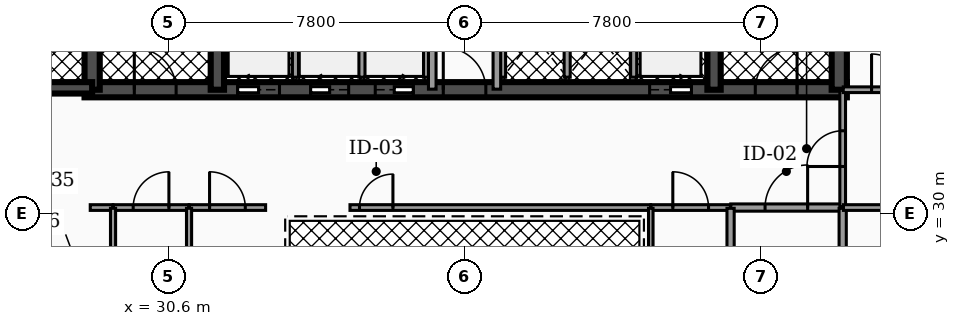
"""IFC4 building model, lengths in metres.
Left out: names, types, materials, properties, quantities, classifications, styles, units other than length and angle.
Written with IfcOpenShell. Run it as: python <this file> out.ifc"""

import sys

from ifc_helpers import new_model, si_unit, direction, frame, frame_2d, origin, place, context, subcontext, project, spatial, rectangle, extrude, element, fill, save


model = new_model("IFC4")
c1 = context("Model", 3, precision=1e-05, world=origin(), true_north=direction((0.0, 1.0)))
c2 = subcontext(c1, "Body", "Model", "MODEL_VIEW")
j1 = project(units=[si_unit("LENGTHUNIT", "METRE"), si_unit("PLANEANGLEUNIT", "RADIAN")], contexts=[c1])
p1 = place(None, origin())
s1 = spatial("IfcSite", under=j1, at=p1, CompositionType="ELEMENT")
p2 = place(p1, origin())
s2 = spatial("IfcBuilding", under=s1, at=p2, CompositionType="ELEMENT")
p3 = place(p2, frame((0.0, 0.0, 190.74)))
s3 = spatial("IfcBuildingStorey", under=s2, at=p3, CompositionType="ELEMENT", Elevation=190.74)
p4 = place(p3, frame((28.4, 33.25, 0.0), z_axis=(0.0, 0.0, 1.0), x_axis=(1.0, 0.0, 0.0)))
e1 = element("IfcWall", 1, at=p4, inside=s3, PredefinedType="SHEAR", context=c2, shape_type="SweptSolid", body=[
    extrude(rectangle(XDim=20.06, YDim=0.4, at=frame_2d((10.03, 0.0))), origin(), (0.0, 0.0, 1.0), 3.39),
])
p5 = place(p4, frame((4.03, 0.0, 0.0)))
e2 = element("IfcOpeningElement", 2, at=p5, cuts=e1, PredefinedType="OPENING", context=c2, shape_type="SweptSolid", body=[
    extrude(rectangle(XDim=1.1, YDim=2.15, at=frame_2d((0.55, 1.075))), frame((0.0, 0.21, 0.0), z_axis=(0.0, -1.0, 0.0), x_axis=(1.0, 0.0, 0.0)), (0.0, 0.0, 1.0), 0.42),
])
p6 = place(p4, frame((14.87, 0.0, 0.0)))
e3 = element("IfcOpeningElement", 3, at=p6, cuts=e1, PredefinedType="OPENING", context=c2, shape_type="SweptSolid", body=[
    extrude(rectangle(XDim=1.1, YDim=2.15, at=frame_2d((0.55, 1.075))), frame((0.0, 0.21, 0.0), z_axis=(0.0, -1.0, 0.0), x_axis=(1.0, 0.0, 0.0)), (0.0, 0.0, 1.0), 0.42),
])
p7 = place(p4, frame((5.95, 0.0, 0.0)))
e4 = element("IfcOpeningElement", 4, at=p7, cuts=e1, PredefinedType="OPENING", context=c2, shape_type="SweptSolid", body=[
    extrude(rectangle(XDim=1.0, YDim=2.1, at=frame_2d((0.5, 1.05))), frame((0.0, 0.21, 0.0), z_axis=(0.0, -1.0, 0.0), x_axis=(1.0, 0.0, 0.0)), (0.0, 0.0, 1.0), 0.42),
])
p8 = place(p4, frame((7.65, 0.0, 0.0)))
e5 = element("IfcOpeningElement", 5, at=p8, cuts=e1, PredefinedType="OPENING", context=c2, shape_type="SweptSolid", body=[
    extrude(rectangle(XDim=1.0, YDim=2.1, at=frame_2d((0.5, 1.05))), frame((0.0, 0.21, 0.0), z_axis=(0.0, -1.0, 0.0), x_axis=(1.0, 0.0, 0.0)), (0.0, 0.0, 1.0), 0.42),
])
p9 = place(p4, frame((1.31, 0.0, 0.0)))
e6 = element("IfcOpeningElement", 6, at=p9, cuts=e1, PredefinedType="OPENING", context=c2, shape_type="SweptSolid", body=[
    extrude(rectangle(XDim=1.1, YDim=2.2, at=frame_2d((0.55, 1.1))), frame((0.0, 0.21, 0.0), z_axis=(0.0, -1.0, 0.0), x_axis=(1.0, 0.0, 0.0)), (0.0, 0.0, 1.0), 0.42),
])
p10 = place(p4, frame((9.44, 0.0, 0.0)))
e7 = element("IfcOpeningElement", 7, at=p10, cuts=e1, PredefinedType="OPENING", context=c2, shape_type="SweptSolid", body=[
    extrude(rectangle(XDim=1.12, YDim=2.05, at=frame_2d((0.56, 1.025))), frame((0.0, 0.21, 0.0), z_axis=(0.0, -1.0, 0.0), x_axis=(1.0, 0.0, 0.0)), (0.0, 0.0, 1.0), 0.42),
])
p11 = place(p4, frame((17.65, 0.0, 0.0)))
e8 = element("IfcOpeningElement", 8, at=p11, cuts=e1, PredefinedType="OPENING", context=c2, shape_type="SweptSolid", body=[
    extrude(rectangle(XDim=1.1, YDim=2.2, at=frame_2d((0.55, 1.1))), frame((0.0, 0.21, 0.0), z_axis=(0.0, -1.0, 0.0), x_axis=(1.0, 0.0, 0.0)), (0.0, 0.0, 1.0), 0.42),
])
p12 = place(p3, frame((28.6, 33.25, 0.0), z_axis=(0.0, 0.0, 1.0), x_axis=(0.0, 1.0, 0.0)))
e9 = element("IfcWall", 9, at=p12, inside=s3, PredefinedType="SHEAR", context=c2, shape_type="SweptSolid", body=[
    extrude(rectangle(XDim=10.2, YDim=0.4, at=frame_2d((5.1, 0.0))), origin(), (0.0, 0.0, 1.0), 3.39),
])
for number, where, z_axis, x_axis in (
    (10, (31.895, 33.25, 0.0), (0.0, 0.0, 1.0), (0.0, 1.0, 0.0)),
    (11, (44.965, 33.25, 0.0), (0.0, 0.0, 1.0), (0.0, 1.0, 0.0)),
):
    element("IfcWall", number, at=place(p3, frame(where, z_axis=z_axis, x_axis=x_axis)), inside=s3, PredefinedType="SHEAR", context=c2, shape_type="SweptSolid", body=[
        extrude(rectangle(XDim=10.2, YDim=0.35, at=frame_2d((5.1, 0.0))), origin(), (0.0, 0.0, 1.0), 3.39),
    ])
p13 = place(p3, frame((48.26, 33.25, 0.0), z_axis=(0.0, 0.0, 1.0), x_axis=(0.0, 1.0, 0.0)))
e12 = element("IfcWall", 12, at=p13, inside=s3, PredefinedType="SHEAR", context=c2, shape_type="SweptSolid", body=[
    extrude(rectangle(XDim=10.2, YDim=0.4, at=frame_2d((5.1, 0.0))), origin(), (0.0, 0.0, 1.0), 3.39),
])
p14 = place(p3, frame((25.08, 33.3, 0.0), z_axis=(0.0, 0.0, 1.0), x_axis=(1.0, 0.0, 0.0)))
e13 = element("IfcWall", 13, at=p14, inside=s3, PredefinedType="SHEAR", context=c2, shape_type="SweptSolid", body=[
    extrude(rectangle(XDim=3.52, YDim=0.3, at=frame_2d((1.76, 0.0))), origin(), (0.0, 0.0, 1.0), 3.39),
])
p15 = place(p14, frame((1.335, 0.0, 0.0)))
e14 = element("IfcOpeningElement", 14, at=p15, cuts=e13, PredefinedType="OPENING", context=c2, shape_type="SweptSolid", body=[
    extrude(rectangle(XDim=0.95, YDim=2.2, at=frame_2d((0.475, 1.1))), frame((0.0, 0.16, 0.0), z_axis=(0.0, -1.0, 0.0), x_axis=(1.0, 0.0, 0.0)), (0.0, 0.0, 1.0), 0.32),
])
for number, where, z_axis, x_axis in (
    (15, (33.95, 33.58, 0.0), (0.0, 0.0, 1.0), (0.0, 1.0, 0.0)),
    (16, (42.85, 33.58, 0.0), (0.0, 0.0, 1.0), (0.0, 1.0, 0.0)),
):
    element("IfcWall", number, at=place(p3, frame(where, z_axis=z_axis, x_axis=x_axis)), inside=s3, PredefinedType="SOLIDWALL", context=c2, shape_type="SweptSolid", body=[
        extrude(rectangle(XDim=2.45, YDim=0.16, at=frame_2d((1.225, 0.0))), origin(), (0.0, 0.0, 1.0), 3.39),
    ])
for number, where, z_axis, x_axis in (
    (17, (35.7, 33.58, 0.0), (0.0, 0.0, 1.0), (0.0, 1.0, 0.0)),
    (18, (37.4, 33.58, 0.0), (0.0, 0.0, 1.0), (0.0, 1.0, 0.0)),
    (19, (39.4, 33.58, 0.0), (0.0, 0.0, 1.0), (0.0, 1.0, 0.0)),
    (20, (41.1, 33.58, 0.0), (0.0, 0.0, 1.0), (0.0, 1.0, 0.0)),
):
    element("IfcWall", number, at=place(p3, frame(where, z_axis=z_axis, x_axis=x_axis)), inside=s3, PredefinedType="SOLIDWALL", context=c2, shape_type="SweptSolid", body=[
        extrude(rectangle(XDim=2.25, YDim=0.16, at=frame_2d((1.125, 0.0))), origin(), (0.0, 0.0, 1.0), 3.39),
    ])
p16 = place(p3, frame((37.55, 33.265, 0.0), z_axis=(0.0, 0.0, 1.0), x_axis=(0.0, 1.0, 0.0)))
e21 = element("IfcWall", 21, at=p16, inside=s3, PredefinedType="PARTITIONING", context=c2, shape_type="SweptSolid", body=[
    extrude(rectangle(XDim=4.595, YDim=0.2, at=frame_2d((2.298, 0.0))), origin(), (0.0, 0.0, 1.0), 2.347),
])
p17 = place(p16, frame((3.058, 0.0, 0.0)))
e22 = element("IfcOpeningElement", 22, at=p17, cuts=e21, PredefinedType="OPENING", context=c2, shape_type="SweptSolid", body=[
    extrude(rectangle(XDim=0.88, YDim=2.05, at=frame_2d((0.44, 1.025))), frame((0.0, 0.11, 0.0), z_axis=(0.0, -1.0, 0.0), x_axis=(1.0, 0.0, 0.0)), (0.0, 0.0, 1.0), 0.22),
])
p18 = place(p3, frame((39.25, 33.265, 0.0), z_axis=(0.0, 0.0, 1.0), x_axis=(0.0, 1.0, 0.0)))
e23 = element("IfcWall", 23, at=p18, inside=s3, PredefinedType="PARTITIONING", context=c2, shape_type="SweptSolid", body=[
    extrude(rectangle(XDim=4.595, YDim=0.2, at=frame_2d((2.298, 0.0))), origin(), (0.0, 0.0, 1.0), 2.347),
])
p19 = place(p18, frame((3.058, 0.0, 0.0)))
e24 = element("IfcOpeningElement", 24, at=p19, cuts=e23, PredefinedType="OPENING", context=c2, shape_type="SweptSolid", body=[
    extrude(rectangle(XDim=0.88, YDim=2.05, at=frame_2d((0.44, 1.025))), frame((0.0, 0.11, 0.0), z_axis=(0.0, -1.0, 0.0), x_axis=(1.0, 0.0, 0.0)), (0.0, 0.0, 1.0), 0.22),
])
p20 = place(p3, frame((45.405, 30.15, 0.0), z_axis=(0.0, 0.0, 1.0), x_axis=(1.0, 0.0, 0.0)))
e25 = element("IfcWall", 25, at=p20, inside=s3, PredefinedType="PARTITIONING", context=c2, shape_type="SweptSolid", body=[
    extrude(rectangle(XDim=2.925, YDim=0.19, at=frame_2d((1.462, 0.0))), origin(), (0.0, 0.0, 1.0), 2.347),
])
p21 = place(p20, frame((0.903, 0.0, 0.0)))
e26 = element("IfcOpeningElement", 26, at=p21, cuts=e25, PredefinedType="OPENING", context=c2, shape_type="SweptSolid", body=[
    extrude(rectangle(XDim=1.12, YDim=2.05, at=frame_2d((0.56, 1.025))), frame((0.0, 0.105, 0.0), z_axis=(0.0, -1.0, 0.0), x_axis=(1.0, 0.0, 0.0)), (0.0, 0.0, 1.0), 0.21),
])
p22 = place(p3, frame((48.35, 30.17, 0.0), z_axis=(0.0, 0.0, 1.0), x_axis=(0.0, 1.0, 0.0)))
e27 = element("IfcWall", 27, at=p22, inside=s3, PredefinedType="PARTITIONING", context=c2, shape_type="SweptSolid", body=[
    extrude(rectangle(XDim=3.06, YDim=0.15, at=frame_2d((1.53, 0.0))), origin(), (0.0, 0.0, 1.0), 2.347),
])
p23 = place(p22, frame((1.06, 0.0, 0.0)))
e28 = element("IfcOpeningElement", 28, at=p23, cuts=e27, PredefinedType="OPENING", context=c2, shape_type="SweptSolid", body=[
    extrude(rectangle(XDim=0.94, YDim=2.05, at=frame_2d((0.47, 1.025))), frame((0.0, 0.085, 0.0), z_axis=(0.0, -1.0, 0.0), x_axis=(1.0, 0.0, 0.0)), (0.0, 0.0, 1.0), 0.17),
])
p24 = place(p3, frame((28.55, 30.15, 0.0), z_axis=(0.0, 0.0, 1.0), x_axis=(1.0, 0.0, 0.0)))
e29 = element("IfcWall", 29, at=p24, inside=s3, PredefinedType="PARTITIONING", context=c2, shape_type="SweptSolid", body=[
    extrude(rectangle(XDim=0.595, YDim=0.15, at=frame_2d((0.297, 0.0))), origin(), (0.0, 0.0, 1.0), 2.347),
])
p25 = place(p3, frame((29.155, 30.15, 0.0), z_axis=(0.0, 0.0, 1.0), x_axis=(1.0, 0.0, 0.0)))
e30 = element("IfcWall", 30, at=p25, inside=s3, PredefinedType="PARTITIONING", context=c2, shape_type="SweptSolid", body=[
    extrude(rectangle(XDim=1.99, YDim=0.15, at=frame_2d((0.995, 0.0))), origin(), (0.0, 0.0, 1.0), 2.347),
])
p26 = place(p25, frame((0.525, 0.0, 0.0)))
e31 = element("IfcOpeningElement", 31, at=p26, cuts=e30, PredefinedType="OPENING", context=c2, shape_type="SweptSolid", body=[
    extrude(rectangle(XDim=0.94, YDim=2.05, at=frame_2d((0.47, 1.025))), frame((0.0, 0.085, 0.0), z_axis=(0.0, -1.0, 0.0), x_axis=(1.0, 0.0, 0.0)), (0.0, 0.0, 1.0), 0.17),
])
p27 = place(p3, frame((31.155, 30.15, 0.0), z_axis=(0.0, 0.0, 1.0), x_axis=(1.0, 0.0, 0.0)))
e32 = element("IfcWall", 32, at=p27, inside=s3, PredefinedType="PARTITIONING", context=c2, shape_type="SweptSolid", body=[
    extrude(rectangle(XDim=2.01, YDim=0.15, at=frame_2d((1.005, 0.0))), origin(), (0.0, 0.0, 1.0), 2.347),
])
p28 = place(p27, frame((0.535, 0.0, 0.0)))
e33 = element("IfcOpeningElement", 33, at=p28, cuts=e32, PredefinedType="OPENING", context=c2, shape_type="SweptSolid", body=[
    extrude(rectangle(XDim=0.94, YDim=2.05, at=frame_2d((0.47, 1.025))), frame((0.0, 0.085, 0.0), z_axis=(0.0, -1.0, 0.0), x_axis=(1.0, 0.0, 0.0)), (0.0, 0.0, 1.0), 0.17),
])
p29 = place(p3, frame((35.385, 30.15, 0.0), z_axis=(0.0, 0.0, 1.0), x_axis=(1.0, 0.0, 0.0)))
e34 = element("IfcWall", 34, at=p29, inside=s3, PredefinedType="PARTITIONING", context=c2, shape_type="SweptSolid", body=[
    extrude(rectangle(XDim=7.91, YDim=0.15, at=frame_2d((3.955, 0.0))), origin(), (0.0, 0.0, 1.0), 2.347),
])
p30 = place(p29, frame((0.25, 0.0, 0.0)))
e35 = element("IfcOpeningElement", 35, at=p30, cuts=e34, PredefinedType="OPENING", context=c2, shape_type="SweptSolid", body=[
    extrude(rectangle(XDim=0.88, YDim=2.05, at=frame_2d((0.44, 1.025))), frame((0.0, 0.085, 0.0), z_axis=(0.0, -1.0, 0.0), x_axis=(1.0, 0.0, 0.0)), (0.0, 0.0, 1.0), 0.17),
])
p31 = place(p3, frame((43.305, 30.15, 0.0), z_axis=(0.0, 0.0, 1.0), x_axis=(1.0, 0.0, 0.0)))
e36 = element("IfcWall", 36, at=p31, inside=s3, PredefinedType="PARTITIONING", context=c2, shape_type="SweptSolid", body=[
    extrude(rectangle(XDim=2.09, YDim=0.15, at=frame_2d((1.045, 0.0))), origin(), (0.0, 0.0, 1.0), 2.347),
])
p32 = place(p31, frame((0.575, 0.0, 0.0)))
e37 = element("IfcOpeningElement", 37, at=p32, cuts=e36, PredefinedType="OPENING", context=c2, shape_type="SweptSolid", body=[
    extrude(rectangle(XDim=0.94, YDim=2.05, at=frame_2d((0.47, 1.025))), frame((0.0, 0.085, 0.0), z_axis=(0.0, -1.0, 0.0), x_axis=(1.0, 0.0, 0.0)), (0.0, 0.0, 1.0), 0.17),
])
for number, where, z_axis, x_axis in (
    (38, (45.4, 27.37, 0.0), (0.0, 0.0, 1.0), (0.0, 1.0, 0.0)),
    (39, (48.35, 27.37, 0.0), (0.0, 0.0, 1.0), (0.0, 1.0, 0.0)),
):
    element("IfcWall", number, at=place(p3, frame(where, z_axis=z_axis, x_axis=x_axis)), inside=s3, PredefinedType="PARTITIONING", context=c2, shape_type="SweptSolid", body=[
        extrude(rectangle(XDim=2.76, YDim=0.19, at=frame_2d((1.38, 0.0))), origin(), (0.0, 0.0, 1.0), 2.347),
    ])
p33 = place(p3, frame((48.37, 30.15, 0.0), z_axis=(0.0, 0.0, 1.0), x_axis=(1.0, 0.0, 0.0)))
e40 = element("IfcWall", 40, at=p33, inside=s3, PredefinedType="PARTITIONING", context=c2, shape_type="SweptSolid", body=[
    extrude(rectangle(XDim=3.26, YDim=0.15, at=frame_2d((1.63, 0.0))), origin(), (0.0, 0.0, 1.0), 2.347),
])
p34 = place(p33, frame((1.16, 0.0, 0.0)))
e41 = element("IfcOpeningElement", 41, at=p34, cuts=e40, PredefinedType="OPENING", context=c2, shape_type="SweptSolid", body=[
    extrude(rectangle(XDim=0.94, YDim=2.05, at=frame_2d((0.47, 1.025))), frame((0.0, 0.085, 0.0), z_axis=(0.0, -1.0, 0.0), x_axis=(1.0, 0.0, 0.0)), (0.0, 0.0, 1.0), 0.17),
])
p35 = place(p3, frame((48.365, 33.25, 0.0), z_axis=(0.0, 0.0, 1.0), x_axis=(1.0, 0.0, 0.0)))
e42 = element("IfcWall", 42, at=p35, inside=s3, PredefinedType="PARTITIONING", context=c2, shape_type="SweptSolid", body=[
    extrude(rectangle(XDim=2.43, YDim=0.15, at=frame_2d((1.215, 0.0))), origin(), (0.0, 0.0, 1.0), 2.347),
])
p36 = place(p35, frame((0.745, 0.0, 0.0)))
e43 = element("IfcOpeningElement", 43, at=p36, cuts=e42, PredefinedType="OPENING", context=c2, shape_type="SweptSolid", body=[
    extrude(rectangle(XDim=0.94, YDim=2.05, at=frame_2d((0.47, 1.025))), frame((0.0, 0.085, 0.0), z_axis=(0.0, -1.0, 0.0), x_axis=(1.0, 0.0, 0.0)), (0.0, 0.0, 1.0), 0.17),
])
p37 = place(p3, frame((29.15, 27.17, 0.0), z_axis=(0.0, 0.0, 1.0), x_axis=(0.0, 1.0, 0.0)))
e44 = element("IfcWall", 44, at=p37, inside=s3, PredefinedType="PARTITIONING", context=c2, shape_type="SweptSolid", body=[
    extrude(rectangle(XDim=2.96, YDim=0.135, at=frame_2d((1.48, 0.0))), origin(), (0.0, 0.0, 1.0), 2.347),
])
p38 = place(p37, frame((1.05, 0.0, 0.0)))
e45 = element("IfcOpeningElement", 45, at=p38, cuts=e44, PredefinedType="OPENING", context=c2, shape_type="SweptSolid", body=[
    extrude(rectangle(XDim=0.86, YDim=2.05, at=frame_2d((0.43, 1.025))), frame((0.0, 0.077, 0.0), z_axis=(0.0, -1.0, 0.0), x_axis=(1.0, 0.0, 0.0)), (0.0, 0.0, 1.0), 0.155),
])
p39 = place(p3, frame((31.15, 27.17, 0.0), z_axis=(0.0, 0.0, 1.0), x_axis=(0.0, 1.0, 0.0)))
e46 = element("IfcWall", 46, at=p39, inside=s3, PredefinedType="PARTITIONING", context=c2, shape_type="SweptSolid", body=[
    extrude(rectangle(XDim=2.96, YDim=0.135, at=frame_2d((1.48, 0.0))), origin(), (0.0, 0.0, 1.0), 2.347),
])
p40 = place(p3, frame((43.3, 23.9, 0.0), z_axis=(0.0, 0.0, 1.0), x_axis=(0.0, 1.0, 0.0)))
e47 = element("IfcWall", 47, at=p40, inside=s3, PredefinedType="PARTITIONING", context=c2, shape_type="SweptSolid", body=[
    extrude(rectangle(XDim=6.23, YDim=0.12, at=frame_2d((3.115, 0.0))), origin(), (0.0, 0.0, 1.0), 2.347),
])
p41 = place(p5, origin())
e48 = element("IfcDoor", 48, at=p41, inside=s3, OperationType="SLIDING_TO_LEFT", PredefinedType="DOOR", context=c2, shape_type="SweptSolid", body=[
    extrude(rectangle(XDim=1.1, YDim=2.15, at=frame_2d((0.55, 1.075))), frame((0.0, 0.025, 0.0), z_axis=(0.0, -1.0, 0.0), x_axis=(1.0, 0.0, 0.0)), (0.0, 0.0, 1.0), 0.05),
])
fill(e2, e48)
p42 = place(p6, origin())
e49 = element("IfcDoor", 49, at=p42, inside=s3, OperationType="SLIDING_TO_RIGHT", PredefinedType="DOOR", context=c2, shape_type="SweptSolid", body=[
    extrude(rectangle(XDim=1.1, YDim=2.15, at=frame_2d((0.55, 1.075))), frame((0.0, 0.025, 0.0), z_axis=(0.0, -1.0, 0.0), x_axis=(1.0, 0.0, 0.0)), (0.0, 0.0, 1.0), 0.05),
])
fill(e3, e49)
p43 = place(p7, origin())
e50 = element("IfcDoor", 50, at=p43, inside=s3, OperationType="SLIDING_TO_LEFT", PredefinedType="DOOR", context=c2, shape_type="SweptSolid", body=[
    extrude(rectangle(XDim=1.0, YDim=2.1, at=frame_2d((0.5, 1.05))), frame((0.0, 0.025, 0.0), z_axis=(0.0, -1.0, 0.0), x_axis=(1.0, 0.0, 0.0)), (0.0, 0.0, 1.0), 0.05),
])
fill(e4, e50)
p44 = place(p8, origin())
e51 = element("IfcDoor", 51, at=p44, inside=s3, OperationType="SLIDING_TO_RIGHT", PredefinedType="DOOR", context=c2, shape_type="SweptSolid", body=[
    extrude(rectangle(XDim=1.0, YDim=2.1, at=frame_2d((0.5, 1.05))), frame((0.0, 0.025, 0.0), z_axis=(0.0, -1.0, 0.0), x_axis=(1.0, 0.0, 0.0)), (0.0, 0.0, 1.0), 0.05),
])
fill(e5, e51)
p45 = place(p9, origin())
e52 = element("IfcDoor", 52, at=p45, inside=s3, OperationType="SINGLE_SWING_LEFT", PredefinedType="DOOR", context=c2, shape_type="SweptSolid", body=[
    extrude(rectangle(XDim=1.1, YDim=2.2, at=frame_2d((0.55, 1.1))), frame((0.0, 0.025, 0.0), z_axis=(0.0, -1.0, 0.0), x_axis=(1.0, 0.0, 0.0)), (0.0, 0.0, 1.0), 0.05),
])
fill(e6, e52)
p46 = place(p10, origin())
e53 = element("IfcDoor", 53, at=p46, inside=s3, OperationType="SINGLE_SWING_LEFT", PredefinedType="DOOR", context=c2, shape_type="SweptSolid", body=[
    extrude(rectangle(XDim=1.12, YDim=2.05, at=frame_2d((0.56, 1.025))), frame((0.0, 0.025, 0.0), z_axis=(0.0, -1.0, 0.0), x_axis=(1.0, 0.0, 0.0)), (0.0, 0.0, 1.0), 0.05),
])
fill(e7, e53)
p47 = place(p11, origin())
e54 = element("IfcDoor", 54, at=p47, inside=s3, OperationType="SINGLE_SWING_RIGHT", PredefinedType="DOOR", context=c2, shape_type="SweptSolid", body=[
    extrude(rectangle(XDim=1.1, YDim=2.2, at=frame_2d((0.55, 1.1))), frame((0.0, 0.025, 0.0), z_axis=(0.0, -1.0, 0.0), x_axis=(1.0, 0.0, 0.0)), (0.0, 0.0, 1.0), 0.05),
])
fill(e8, e54)
p48 = place(p21, origin())
e55 = element("IfcDoor", 55, at=p48, inside=s3, OperationType="SINGLE_SWING_RIGHT", PredefinedType="DOOR", context=c2, shape_type="SweptSolid", body=[
    extrude(rectangle(XDim=1.12, YDim=2.05, at=frame_2d((0.56, 1.025))), frame((0.0, 0.025, 0.0), z_axis=(0.0, -1.0, 0.0), x_axis=(1.0, 0.0, 0.0)), (0.0, 0.0, 1.0), 0.05),
])
fill(e26, e55)
p49 = place(p23, origin())
e56 = element("IfcDoor", 56, at=p49, inside=s3, OperationType="SINGLE_SWING_LEFT", PredefinedType="DOOR", context=c2, shape_type="SweptSolid", body=[
    extrude(rectangle(XDim=0.94, YDim=2.05, at=frame_2d((0.47, 1.025))), frame((0.0, 0.025, 0.0), z_axis=(0.0, -1.0, 0.0), x_axis=(1.0, 0.0, 0.0)), (0.0, 0.0, 1.0), 0.05),
])
fill(e28, e56)
p50 = place(p26, origin())
e57 = element("IfcDoor", 57, at=p50, inside=s3, OperationType="SINGLE_SWING_RIGHT", PredefinedType="DOOR", context=c2, shape_type="SweptSolid", body=[
    extrude(rectangle(XDim=0.94, YDim=2.05, at=frame_2d((0.47, 1.025))), frame((0.0, 0.025, 0.0), z_axis=(0.0, -1.0, 0.0), x_axis=(1.0, 0.0, 0.0)), (0.0, 0.0, 1.0), 0.05),
])
fill(e31, e57)
p51 = place(p28, origin())
e58 = element("IfcDoor", 58, at=p51, inside=s3, OperationType="SINGLE_SWING_LEFT", PredefinedType="DOOR", context=c2, shape_type="SweptSolid", body=[
    extrude(rectangle(XDim=0.94, YDim=2.05, at=frame_2d((0.47, 1.025))), frame((0.0, 0.025, 0.0), z_axis=(0.0, -1.0, 0.0), x_axis=(1.0, 0.0, 0.0)), (0.0, 0.0, 1.0), 0.05),
])
fill(e33, e58)
p52 = place(p30, origin())
e59 = element("IfcDoor", 59, at=p52, inside=s3, OperationType="SINGLE_SWING_RIGHT", PredefinedType="DOOR", context=c2, shape_type="SweptSolid", body=[
    extrude(rectangle(XDim=0.88, YDim=2.05, at=frame_2d((0.44, 1.025))), frame((0.0, 0.025, 0.0), z_axis=(0.0, -1.0, 0.0), x_axis=(1.0, 0.0, 0.0)), (0.0, 0.0, 1.0), 0.05),
])
fill(e35, e59)
p53 = place(p32, origin())
e60 = element("IfcDoor", 60, at=p53, inside=s3, OperationType="SINGLE_SWING_LEFT", PredefinedType="DOOR", context=c2, shape_type="SweptSolid", body=[
    extrude(rectangle(XDim=0.94, YDim=2.05, at=frame_2d((0.47, 1.025))), frame((0.0, 0.025, 0.0), z_axis=(0.0, -1.0, 0.0), x_axis=(1.0, 0.0, 0.0)), (0.0, 0.0, 1.0), 0.05),
])
fill(e37, e60)
p54 = place(p36, origin())
e61 = element("IfcDoor", 61, at=p54, inside=s3, OperationType="SINGLE_SWING_LEFT", PredefinedType="DOOR", context=c2, shape_type="SweptSolid", body=[
    extrude(rectangle(XDim=0.94, YDim=2.05, at=frame_2d((0.47, 1.025))), frame((0.0, 0.025, 0.0), z_axis=(0.0, -1.0, 0.0), x_axis=(1.0, 0.0, 0.0)), (0.0, 0.0, 1.0), 0.05),
])
fill(e43, e61)
save(model, sys.argv[1])
